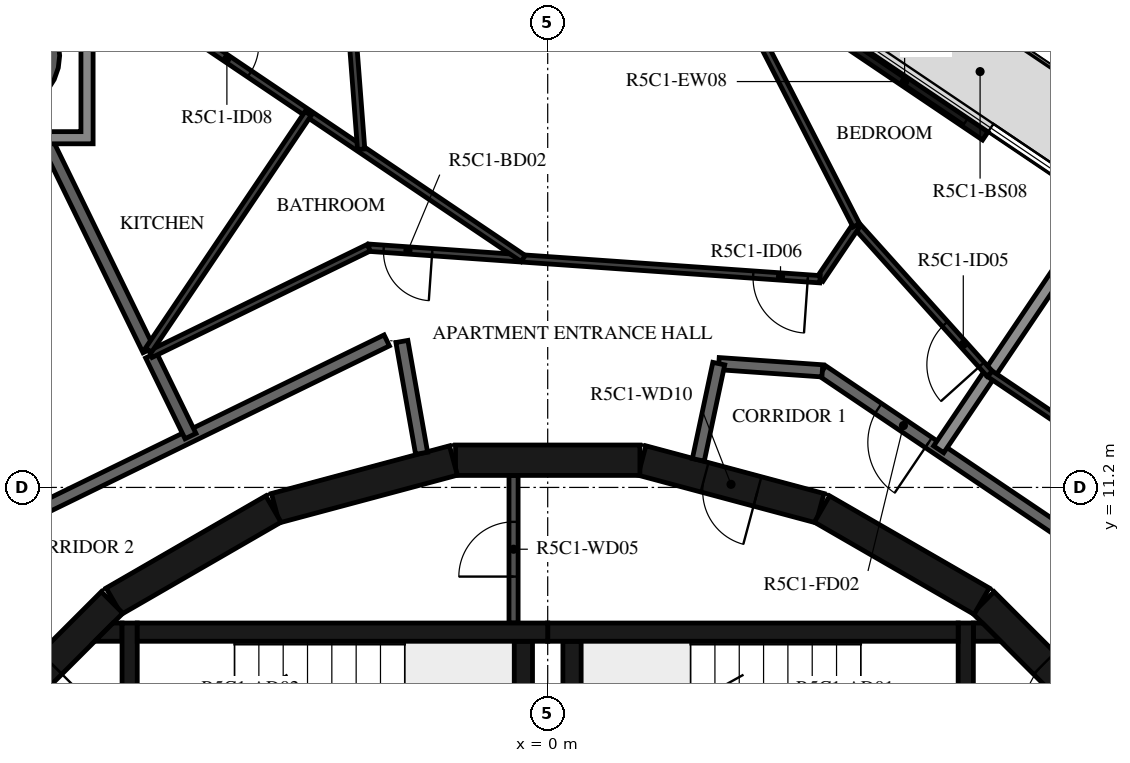
"""IFC4 building model, lengths in metres.
Left out: names, types, materials, properties, quantities, classifications, styles, units other than length and angle.
Written with IfcOpenShell. Run it as: python <this file> out.ifc"""

import sys

from ifc_helpers import new_model, si_unit, direction, frame, frame_2d, origin, origin_2d, place, context, subcontext, project, spatial, polyline, rectangle, hollow_circle, outline, extrude, element, fill, save


model = new_model("IFC4")
c1 = context("Model", 3, precision=1e-05, world=origin(), true_north=direction((0.0, 1.0)))
c2 = subcontext(c1, "Body", "Model", "MODEL_VIEW")
j1 = project(units=[si_unit("LENGTHUNIT", "METRE"), si_unit("PLANEANGLEUNIT", "RADIAN")], contexts=[c1])
p1 = place(None, origin())
s1 = spatial("IfcSite", under=j1, at=p1, CompositionType="ELEMENT")
p2 = place(p1, origin())
s2 = spatial("IfcBuilding", under=s1, at=p2, CompositionType="ELEMENT")
p3 = place(p2, frame((0.0, 0.0, 212.9)))
s3 = spatial("IfcBuildingStorey", under=s2, at=p3, CompositionType="ELEMENT", Elevation=212.9)
p4 = place(p3, frame((-8.926, 18.301, -0.38), z_axis=(0.0, 0.0, 1.0), x_axis=(1.0, 0.0, 0.0)))
e1 = element("IfcColumn", 1, at=p4, inside=s3, PredefinedType="COLUMN", context=c2, shape_type="SweptSolid", body=[
    extrude(hollow_circle(Radius=0.9, WallThickness=0.04, at=origin_2d()), origin(), (0.0, 0.0, 1.0), 3.5),
])
p5 = place(p3, frame((7.196, 16.98, 0.0), z_axis=(0.0, 0.0, 1.0), x_axis=(-0.829044984211, 0.559181915082, 0.0)))
e2 = element("IfcWall", 2, at=p5, inside=s3, PredefinedType="STANDARD", context=c2, shape_type="SweptSolid", body=[
    extrude(rectangle(XDim=3.2, YDim=0.16, at=frame_2d((1.6, 0.0))), origin(), (0.0, 0.0, 1.0), 3.12),
])
p6 = place(p5, frame((0.4, 0.0, 0.0)))
e3 = element("IfcOpeningElement", 3, at=p6, cuts=e2, PredefinedType="OPENING", context=c2, shape_type="SweptSolid", body=[
    extrude(rectangle(XDim=2.4, YDim=2.4, at=frame_2d((1.2, 1.2))), frame((0.0, 0.09, 0.0), z_axis=(0.0, -1.0, 0.0), x_axis=(1.0, 0.0, 0.0)), (0.0, 0.0, 1.0), 0.18),
])
p7 = place(p3, frame((9.308, 7.164, 0.0), z_axis=(0.0, 0.0, 1.0), x_axis=(-0.707106781187, 0.707106781187, 0.0)))
e4 = element("IfcWall", 4, at=p7, inside=s3, PredefinedType="SHEAR", context=c2, shape_type="SweptSolid", body=[
    extrude(rectangle(XDim=3.032, YDim=0.5, at=frame_2d((1.516, 0.0))), origin(), (0.0, 0.0, 1.0), 3.12),
])
p8 = place(p7, frame((0.416, 0.0, 0.0)))
e5 = element("IfcOpeningElement", 5, at=p8, cuts=e4, PredefinedType="OPENING", context=c2, shape_type="SweptSolid", body=[
    extrude(rectangle(XDim=1.2, YDim=2.1, at=frame_2d((0.6, 1.05))), frame((0.0, 0.26, 0.0), z_axis=(0.0, -1.0, 0.0), x_axis=(1.0, 0.0, 0.0)), (0.0, 0.0, 1.0), 0.52),
])
p9 = place(p3, frame((7.137, 9.329, 0.0), z_axis=(0.0, 0.0, 1.0), x_axis=(-0.865975092491, 0.500087131594, 0.0)))
e6 = element("IfcWall", 6, at=p9, inside=s3, PredefinedType="SHEAR", context=c2, shape_type="SweptSolid", body=[
    extrude(rectangle(XDim=3.033, YDim=0.5, at=frame_2d((1.516, 0.0))), origin(), (0.0, 0.0, 1.0), 3.12),
])
p10 = place(p3, frame((4.479, 10.858, 0.0), z_axis=(0.0, 0.0, 1.0), x_axis=(-0.965948410781, 0.258734743916, 0.0)))
e7 = element("IfcWall", 7, at=p10, inside=s3, PredefinedType="SHEAR", context=c2, shape_type="SweptSolid", body=[
    extrude(rectangle(XDim=3.033, YDim=0.5, at=frame_2d((1.516, 0.0))), origin(), (0.0, 0.0, 1.0), 3.12),
])
p11 = place(p10, frame((1.066, 0.0, 0.0)))
e8 = element("IfcOpeningElement", 8, at=p11, cuts=e7, PredefinedType="OPENING", context=c2, shape_type="SweptSolid", body=[
    extrude(rectangle(XDim=0.9, YDim=2.1, at=frame_2d((0.45, 1.05))), frame((0.0, 0.26, 0.0), z_axis=(0.0, -1.0, 0.0), x_axis=(1.0, 0.0, 0.0)), (0.0, 0.0, 1.0), 0.52),
])
for number, where, z_axis, x_axis in (
    (9, (1.516, 11.647, 0.0), (0.0, 0.0, 1.0), (-1.0, 0.0, 0.0)),
    (10, (-1.55, 11.643, 0.0), (0.0, 0.0, 1.0), (-0.966, -0.259, 0.0)),
    (11, (-4.51, 10.845, 0.0), (0.0, 0.0, 1.0), (-0.866, -0.5, 0.0)),
):
    element("IfcWall", number, at=place(p3, frame(where, z_axis=z_axis, x_axis=x_axis)), inside=s3, PredefinedType="SHEAR", context=c2, shape_type="SweptSolid", body=[
        extrude(rectangle(XDim=3.033, YDim=0.5, at=frame_2d((1.516, 0.0))), origin(), (0.0, 0.0, 1.0), 3.12),
    ])
p12 = place(p3, frame((-7.164, 9.308, 0.0), z_axis=(0.0, 0.0, 1.0), x_axis=(-0.707106781187, -0.707106781187, 0.0)))
e12 = element("IfcWall", 12, at=p12, inside=s3, PredefinedType="SHEAR", context=c2, shape_type="SweptSolid", body=[
    extrude(rectangle(XDim=3.032, YDim=0.5, at=frame_2d((1.516, 0.0))), origin(), (0.0, 0.0, 1.0), 3.12),
])
p13 = place(p12, frame((1.416, 0.0, 0.0)))
e13 = element("IfcOpeningElement", 13, at=p13, cuts=e12, PredefinedType="OPENING", context=c2, shape_type="SweptSolid", body=[
    extrude(rectangle(XDim=1.2, YDim=2.1, at=frame_2d((0.6, 1.05))), frame((0.0, 0.26, 0.0), z_axis=(0.0, -1.0, 0.0), x_axis=(1.0, 0.0, 0.0)), (0.0, 0.0, 1.0), 0.52),
])
p14 = place(p3, frame((0.0, 8.82, 0.0), z_axis=(0.0, 0.0, 1.0), x_axis=(1.0, 0.0, 0.0)))
e14 = element("IfcWall", 14, at=p14, inside=s3, PredefinedType="SHEAR", context=c2, shape_type="SweptSolid", body=[
    extrude(rectangle(XDim=6.75, YDim=0.3, at=frame_2d((3.375, 0.0))), origin(), (0.0, 0.0, 1.0), 3.12),
])
p15 = place(p3, frame((0.4, 5.35, 0.0), z_axis=(0.0, 0.0, 1.0), x_axis=(0.0, 1.0, 0.0)))
e15 = element("IfcWall", 15, at=p15, inside=s3, PredefinedType="SHEAR", context=c2, shape_type="SweptSolid", body=[
    extrude(rectangle(XDim=3.32, YDim=0.3, at=frame_2d((1.66, 0.0))), origin(), (0.0, 0.0, 1.0), 3.12),
])
p16 = place(p3, frame((6.875, 5.05, 0.0), z_axis=(0.0, 0.0, 1.0), x_axis=(0.0, 1.0, 0.0)))
e16 = element("IfcWall", 16, at=p16, inside=s3, PredefinedType="SHEAR", context=c2, shape_type="SweptSolid", body=[
    extrude(rectangle(XDim=3.92, YDim=0.25, at=frame_2d((1.96, 0.0))), origin(), (0.0, 0.0, 1.0), 3.12),
])
p17 = place(p16, frame((1.11, 0.0, 0.0)))
e17 = element("IfcOpeningElement", 17, at=p17, cuts=e16, PredefinedType="OPENING", context=c2, shape_type="SweptSolid", body=[
    extrude(rectangle(XDim=1.2, YDim=2.1, at=frame_2d((0.6, 1.05))), frame((0.0, 0.135, 0.0), z_axis=(0.0, -1.0, 0.0), x_axis=(1.0, 0.0, 0.0)), (0.0, 0.0, 1.0), 0.27),
])
p18 = place(p3, origin())
e18 = element("IfcWall", 18, at=p18, inside=s3, PredefinedType="SHEAR", context=c2, shape_type="SweptSolid", body=[
    extrude(outline(polyline([(7.448, 8.67), (7.0, 8.67), (7.0, 8.97), (7.148, 8.97), (7.448, 8.67)])), origin(), (0.0, 0.0, 1.0), 3.12),
])
p19 = place(p3, frame((-6.75, 8.82, 0.0), z_axis=(0.0, 0.0, 1.0), x_axis=(1.0, 0.0, 0.0)))
e19 = element("IfcWall", 19, at=p19, inside=s3, PredefinedType="SHEAR", context=c2, shape_type="SweptSolid", body=[
    extrude(rectangle(XDim=6.75, YDim=0.3, at=frame_2d((3.375, 0.0))), origin(), (0.0, 0.0, 1.0), 3.12),
])
p20 = place(p3, frame((-0.4, 5.35, 0.0), z_axis=(0.0, 0.0, 1.0), x_axis=(0.0, 1.0, 0.0)))
e20 = element("IfcWall", 20, at=p20, inside=s3, PredefinedType="SHEAR", context=c2, shape_type="SweptSolid", body=[
    extrude(rectangle(XDim=3.32, YDim=0.3, at=frame_2d((1.66, 0.0))), origin(), (0.0, 0.0, 1.0), 3.12),
])
p21 = place(p3, frame((-6.875, 8.97, 0.0), z_axis=(0.0, 0.0, 1.0), x_axis=(0.0, -1.0, 0.0)))
e21 = element("IfcWall", 21, at=p21, inside=s3, PredefinedType="SHEAR", context=c2, shape_type="SweptSolid", body=[
    extrude(rectangle(XDim=3.92, YDim=0.25, at=frame_2d((1.96, 0.0))), origin(), (0.0, 0.0, 1.0), 3.12),
])
p22 = place(p21, frame((1.61, 0.0, 0.0)))
e22 = element("IfcOpeningElement", 22, at=p22, cuts=e21, PredefinedType="OPENING", context=c2, shape_type="SweptSolid", body=[
    extrude(rectangle(XDim=1.2, YDim=2.1, at=frame_2d((0.6, 1.05))), frame((0.0, 0.135, 0.0), z_axis=(0.0, -1.0, 0.0), x_axis=(1.0, 0.0, 0.0)), (0.0, 0.0, 1.0), 0.27),
])
p23 = place(p3, origin())
e23 = element("IfcWall", 23, at=p23, inside=s3, PredefinedType="SHEAR", context=c2, shape_type="SweptSolid", body=[
    extrude(outline(polyline([(-7.148, 8.97), (-7.0, 8.97), (-7.0, 8.67), (-7.448, 8.67), (-7.148, 8.97)])), origin(), (0.0, 0.0, 1.0), 3.12),
])
p24 = place(p3, frame((-0.562, 8.97, 0.0), z_axis=(0.0, 0.0, 1.0), x_axis=(0.0, 1.0, 0.0)))
e24 = element("IfcWall", 24, at=p24, inside=s3, PredefinedType="PARTITIONING", context=c2, shape_type="SweptSolid", body=[
    extrude(rectangle(XDim=2.427, YDim=0.15, at=frame_2d((1.214, 0.0))), origin(), (0.0, 0.0, 1.0), 3.12),
])
p25 = place(p24, frame((0.764, 0.0, 0.0)))
e25 = element("IfcOpeningElement", 25, at=p25, cuts=e24, PredefinedType="OPENING", context=c2, shape_type="SweptSolid", body=[
    extrude(rectangle(XDim=0.9, YDim=2.1, at=frame_2d((0.45, 1.05))), frame((0.0, 0.085, 0.0), z_axis=(0.0, -1.0, 0.0), x_axis=(1.0, 0.0, 0.0)), (0.0, 0.0, 1.0), 0.17),
])
p26 = place(p3, frame((10.47, 9.101, 0.0), z_axis=(0.0, 0.0, 1.0), x_axis=(-0.829035841718, 0.559195469534, 0.0)))
e26 = element("IfcWall", 26, at=p26, inside=s3, PredefinedType="STANDARD", context=c2, shape_type="SweptSolid", body=[
    extrude(rectangle(XDim=7.181, YDim=0.2, at=frame_2d((3.591, 0.0))), origin(), (0.0, 0.0, 1.0), 3.12),
])
p27 = place(p26, frame((0.2, 0.0, 0.0)))
e27 = element("IfcOpeningElement", 27, at=p27, cuts=e26, PredefinedType="OPENING", context=c2, shape_type="SweptSolid", body=[
    extrude(rectangle(XDim=1.0, YDim=2.1, at=frame_2d((0.5, 1.05))), frame((0.0, 0.11, 0.0), z_axis=(0.0, -1.0, 0.0), x_axis=(1.0, 0.0, 0.0)), (0.0, 0.0, 1.0), 0.22),
])
p28 = place(p26, frame((5.073, 0.0, 0.0)))
e28 = element("IfcOpeningElement", 28, at=p28, cuts=e26, PredefinedType="OPENING", context=c2, shape_type="SweptSolid", body=[
    extrude(rectangle(XDim=1.0, YDim=2.1, at=frame_2d((0.5, 1.05))), frame((0.0, 0.11, 0.0), z_axis=(0.0, -1.0, 0.0), x_axis=(1.0, 0.0, 0.0)), (0.0, 0.0, 1.0), 0.22),
])
p29 = place(p3, frame((4.517, 13.117, 0.0), z_axis=(0.0, 0.0, 1.0), x_axis=(-0.997562153664, 0.069783591025, 0.0)))
e29 = element("IfcWall", 29, at=p29, inside=s3, PredefinedType="STANDARD", context=c2, shape_type="SweptSolid", body=[
    extrude(rectangle(XDim=1.707, YDim=0.2, at=frame_2d((0.854, 0.0))), origin(), (0.0, 0.0, 1.0), 3.12),
])
p30 = place(p3, frame((2.813, 13.236, 0.0), z_axis=(0.0, 0.0, 1.0), x_axis=(-0.207911086063, -0.978147729278, 0.0)))
e30 = element("IfcWall", 30, at=p30, inside=s3, PredefinedType="STANDARD", context=c2, shape_type="SweptSolid", body=[
    extrude(rectangle(XDim=1.618, YDim=0.2, at=frame_2d((0.809, 0.0))), origin(), (0.0, 0.0, 1.0), 3.12),
])
p31 = place(p3, frame((-2.074, 11.761, 0.0), z_axis=(0.0, 0.0, 1.0), x_axis=(-0.173740587112, 0.984791454263, 0.0)))
e31 = element("IfcWall", 31, at=p31, inside=s3, PredefinedType="STANDARD", context=c2, shape_type="SweptSolid", body=[
    extrude(rectangle(XDim=1.867, YDim=0.2, at=frame_2d((0.934, 0.0))), origin(), (0.0, 0.0, 1.0), 3.12),
])
p32 = place(p3, frame((-2.647, 13.618, 0.0), z_axis=(0.0, 0.0, 1.0), x_axis=(-0.898796543751, -0.438366026218, 0.0)))
e32 = element("IfcWall", 32, at=p32, inside=s3, PredefinedType="STANDARD", context=c2, shape_type="SweptSolid", body=[
    extrude(rectangle(XDim=7.181, YDim=0.2, at=frame_2d((3.591, 0.0))), origin(), (0.0, 0.0, 1.0), 3.12),
])
p33 = place(p3, frame((9.104, 15.79, 0.0), z_axis=(0.0, 0.0, 1.0), x_axis=(-0.559193912135, -0.829036892201, 0.0)))
e33 = element("IfcWall", 33, at=p33, inside=s3, PredefinedType="STANDARD", context=c2, shape_type="SweptSolid", body=[
    extrude(rectangle(XDim=4.781, YDim=0.2, at=frame_2d((2.39, 0.0))), origin(), (0.0, 0.0, 1.0), 2.73),
])
p34 = place(p3, frame((-6.522, 13.373, 0.0), z_axis=(0.0, 0.0, 1.0), x_axis=(0.438277270821, -0.8988398266, 0.0)))
e34 = element("IfcWall", 34, at=p34, inside=s3, PredefinedType="STANDARD", context=c2, shape_type="SweptSolid", body=[
    extrude(rectangle(XDim=1.479, YDim=0.2, at=frame_2d((0.74, 0.0))), origin(), (0.0, 0.0, 1.0), 3.12),
])
p35 = place(p3, frame((-8.219, 16.851, 0.0), z_axis=(0.0, 0.0, 1.0), x_axis=(0.438291091101, -0.898833087654, 0.0)))
e35 = element("IfcWall", 35, at=p35, inside=s3, PredefinedType="STANDARD", context=c2, shape_type="SweptSolid", body=[
    extrude(rectangle(XDim=3.774, YDim=0.2, at=frame_2d((1.887, 0.0))), origin(), (0.0, 0.0, 1.0), 3.12),
])
p36 = place(p3, frame((11.642, 10.12, 0.0), z_axis=(0.0, 0.0, 1.0), x_axis=(-0.829054664054, 0.559167563446, 0.0)))
e36 = element("IfcWall", 36, at=p36, inside=s3, PredefinedType="PARTITIONING", context=c2, shape_type="SweptSolid", body=[
    extrude(rectangle(XDim=5.275, YDim=0.12, at=frame_2d((2.637, 0.0))), origin(), (0.0, 0.0, 1.0), 3.12),
])
p37 = place(p36, frame((0.2, 0.0, 0.0)))
e37 = element("IfcOpeningElement", 37, at=p37, cuts=e36, PredefinedType="OPENING", context=c2, shape_type="SweptSolid", body=[
    extrude(rectangle(XDim=0.9, YDim=2.1, at=frame_2d((0.45, 1.05))), frame((0.0, 0.07, 0.0), z_axis=(0.0, -1.0, 0.0), x_axis=(1.0, 0.0, 0.0)), (0.0, 0.0, 1.0), 0.14),
])
p38 = place(p3, frame((7.269, 13.07, 0.0), z_axis=(0.0, 0.0, 1.0), x_axis=(-0.668495993587, 0.743715743116, 0.0)))
e38 = element("IfcWall", 38, at=p38, inside=s3, PredefinedType="PARTITIONING", context=c2, shape_type="SweptSolid", body=[
    extrude(rectangle(XDim=3.281, YDim=0.12, at=frame_2d((1.641, 0.0))), origin(), (0.0, 0.0, 1.0), 3.12),
])
p39 = place(p38, frame((0.2, 0.0, 0.0)))
e39 = element("IfcOpeningElement", 39, at=p39, cuts=e38, PredefinedType="OPENING", context=c2, shape_type="SweptSolid", body=[
    extrude(rectangle(XDim=0.9, YDim=2.1, at=frame_2d((0.45, 1.05))), frame((0.0, 0.07, 0.0), z_axis=(0.0, -1.0, 0.0), x_axis=(1.0, 0.0, 0.0)), (0.0, 0.0, 1.0), 0.14),
])
p40 = place(p3, frame((5.075, 15.51, 0.0), z_axis=(0.0, 0.0, 1.0), x_axis=(-0.559221936342, -0.829017988896, 0.0)))
e40 = element("IfcWall", 40, at=p40, inside=s3, PredefinedType="PARTITIONING", context=c2, shape_type="SweptSolid", body=[
    extrude(rectangle(XDim=1.07, YDim=0.12, at=frame_2d((0.535, 0.0))), origin(), (0.0, 0.0, 1.0), 3.12),
])
p41 = place(p3, frame((4.477, 14.623, 0.0), z_axis=(0.0, 0.0, 1.0), x_axis=(-0.997564862172, 0.069744861884, 0.0)))
e41 = element("IfcWall", 41, at=p41, inside=s3, PredefinedType="PARTITIONING", context=c2, shape_type="SweptSolid", body=[
    extrude(rectangle(XDim=7.438, YDim=0.12, at=frame_2d((3.719, 0.0))), origin(), (0.0, 0.0, 1.0), 3.12),
])
p42 = place(p41, frame((0.2, 0.0, 0.0)))
e42 = element("IfcOpeningElement", 42, at=p42, cuts=e41, PredefinedType="OPENING", context=c2, shape_type="SweptSolid", body=[
    extrude(rectangle(XDim=0.9, YDim=2.1, at=frame_2d((0.45, 1.05))), frame((0.0, 0.07, 0.0), z_axis=(0.0, -1.0, 0.0), x_axis=(1.0, 0.0, 0.0)), (0.0, 0.0, 1.0), 0.14),
])
p43 = place(p41, frame((6.392, 0.0, 0.0)))
e43 = element("IfcOpeningElement", 43, at=p43, cuts=e41, PredefinedType="OPENING", context=c2, shape_type="SweptSolid", body=[
    extrude(rectangle(XDim=0.8, YDim=2.1, at=frame_2d((0.4, 1.05))), frame((0.0, 0.07, 0.0), z_axis=(0.0, -1.0, 0.0), x_axis=(1.0, 0.0, 0.0)), (0.0, 0.0, 1.0), 0.14),
])
p44 = place(p3, frame((-2.943, 15.142, 0.0), z_axis=(0.0, 0.0, 1.0), x_axis=(-0.89881075705, -0.438336883014, 0.0)))
e44 = element("IfcWall", 44, at=p44, inside=s3, PredefinedType="PARTITIONING", context=c2, shape_type="SweptSolid", body=[
    extrude(rectangle(XDim=3.992, YDim=0.12, at=frame_2d((1.996, 0.0))), origin(), (0.0, 0.0, 1.0), 3.12),
])
p45 = place(p3, frame((2.696, 20.148, 0.0), z_axis=(0.0, 0.0, 1.0), x_axis=(0.456387956197, -0.889780890691, 0.0)))
e45 = element("IfcWall", 45, at=p45, inside=s3, PredefinedType="PARTITIONING", context=c2, shape_type="SweptSolid", body=[
    extrude(rectangle(XDim=5.213, YDim=0.12, at=frame_2d((2.606, 0.0))), origin(), (0.0, 0.0, 1.0), 3.12),
])
p46 = place(p3, frame((-7.476, 19.735, 0.0), z_axis=(0.0, 0.0, 1.0), x_axis=(0.829035412992, -0.559196105142, 0.0)))
e46 = element("IfcWall", 46, at=p46, inside=s3, PredefinedType="PARTITIONING", context=c2, shape_type="SweptSolid", body=[
    extrude(rectangle(XDim=8.531, YDim=0.12, at=frame_2d((4.266, 0.0))), origin(), (0.0, 0.0, 1.0), 3.12),
])
p47 = place(p46, frame((2.204, 0.0, 0.0)))
e47 = element("IfcOpeningElement", 47, at=p47, cuts=e46, PredefinedType="OPENING", context=c2, shape_type="SweptSolid", body=[
    extrude(rectangle(XDim=0.9, YDim=2.1, at=frame_2d((0.45, 1.05))), frame((0.0, 0.07, 0.0), z_axis=(0.0, -1.0, 0.0), x_axis=(1.0, 0.0, 0.0)), (0.0, 0.0, 1.0), 0.14),
])
p48 = place(p3, frame((-3.653, 24.394, 0.0), z_axis=(0.0, 0.0, 1.0), x_axis=(0.076513576433, -0.997068539581, 0.0)))
e48 = element("IfcWall", 48, at=p48, inside=s3, PredefinedType="PARTITIONING", context=c2, shape_type="SweptSolid", body=[
    extrude(rectangle(XDim=7.655, YDim=0.12, at=frame_2d((3.827, 0.0))), origin(), (0.0, 0.0, 1.0), 3.12),
])
p49 = place(p48, frame((0.6, 0.0, 0.0)))
e49 = element("IfcOpeningElement", 49, at=p49, cuts=e48, PredefinedType="OPENING", context=c2, shape_type="SweptSolid", body=[
    extrude(rectangle(XDim=0.9, YDim=2.1, at=frame_2d((0.45, 1.05))), frame((0.0, 0.07, 0.0), z_axis=(0.0, -1.0, 0.0), x_axis=(1.0, 0.0, 0.0)), (0.0, 0.0, 1.0), 0.14),
])
p50 = place(p3, frame((-3.939, 17.35, 0.0), z_axis=(0.0, 0.0, 1.0), x_axis=(-0.559193216274, -0.829037361566, 0.0)))
e50 = element("IfcWall", 50, at=p50, inside=s3, PredefinedType="PARTITIONING", context=c2, shape_type="SweptSolid", body=[
    extrude(rectangle(XDim=4.694, YDim=0.12, at=frame_2d((2.347, 0.0))), origin(), (0.0, 0.0, 1.0), 3.12),
])
p51 = place(p3, origin())
e51 = element("IfcWall", 51, at=p51, inside=s3, PredefinedType="STANDARD", context=c2, shape_type="SweptSolid", body=[
    extrude(outline(polyline([(-7.476, 19.751), (-7.476, 16.851), (-10.376, 16.851), (-10.376, 19.751), (-7.476, 19.751)]), holes=[polyline([(-10.176, 17.051), (-7.676, 17.051), (-7.676, 19.551), (-10.176, 19.551), (-10.176, 17.051)])]), origin(), (0.0, 0.0, 1.0), 3.12),
])
p52 = place(p6, origin())
e52 = element("IfcDoor", 52, at=p52, inside=s3, OperationType="DOUBLE_DOOR_SLIDING", PredefinedType="DOOR", context=c2, shape_type="SweptSolid", body=[
    extrude(rectangle(XDim=2.4, YDim=2.4, at=frame_2d((1.2, 1.2))), frame((0.0, 0.025, 0.0), z_axis=(0.0, -1.0, 0.0), x_axis=(1.0, 0.0, 0.0)), (0.0, 0.0, 1.0), 0.05),
])
fill(e3, e52)
p53 = place(p8, origin())
e53 = element("IfcDoor", 53, at=p53, inside=s3, OperationType="SINGLE_SWING_RIGHT", PredefinedType="DOOR", context=c2, shape_type="SweptSolid", body=[
    extrude(rectangle(XDim=1.2, YDim=2.1, at=frame_2d((0.6, 1.05))), frame((0.0, 0.025, 0.0), z_axis=(0.0, -1.0, 0.0), x_axis=(1.0, 0.0, 0.0)), (0.0, 0.0, 1.0), 0.05),
])
fill(e5, e53)
p54 = place(p13, origin())
e54 = element("IfcDoor", 54, at=p54, inside=s3, OperationType="SINGLE_SWING_RIGHT", PredefinedType="DOOR", context=c2, shape_type="SweptSolid", body=[
    extrude(rectangle(XDim=1.2, YDim=2.1, at=frame_2d((0.6, 1.05))), frame((0.0, 0.025, 0.0), z_axis=(0.0, -1.0, 0.0), x_axis=(1.0, 0.0, 0.0)), (0.0, 0.0, 1.0), 0.05),
])
fill(e13, e54)
p55 = place(p25, origin())
e55 = element("IfcDoor", 55, at=p55, inside=s3, OperationType="SINGLE_SWING_LEFT", PredefinedType="DOOR", context=c2, shape_type="SweptSolid", body=[
    extrude(rectangle(XDim=0.9, YDim=2.1, at=frame_2d((0.45, 1.05))), frame((0.0, 0.025, 0.0), z_axis=(0.0, -1.0, 0.0), x_axis=(1.0, 0.0, 0.0)), (0.0, 0.0, 1.0), 0.05),
])
fill(e25, e55)
p56 = place(p11, origin())
e56 = element("IfcDoor", 56, at=p56, inside=s3, OperationType="SINGLE_SWING_RIGHT", PredefinedType="DOOR", context=c2, shape_type="SweptSolid", body=[
    extrude(rectangle(XDim=0.9, YDim=2.1, at=frame_2d((0.45, 1.05))), frame((0.0, 0.025, 0.0), z_axis=(0.0, -1.0, 0.0), x_axis=(1.0, 0.0, 0.0)), (0.0, 0.0, 1.0), 0.05),
])
fill(e8, e56)
p57 = place(p28, origin())
e57 = element("IfcDoor", 57, at=p57, inside=s3, OperationType="SINGLE_SWING_RIGHT", PredefinedType="DOOR", context=c2, shape_type="SweptSolid", body=[
    extrude(rectangle(XDim=1.0, YDim=2.1, at=frame_2d((0.5, 1.05))), frame((0.0, 0.025, 0.0), z_axis=(0.0, -1.0, 0.0), x_axis=(1.0, 0.0, 0.0)), (0.0, 0.0, 1.0), 0.05),
])
fill(e28, e57)
p58 = place(p39, origin())
e58 = element("IfcDoor", 58, at=p58, inside=s3, OperationType="SINGLE_SWING_RIGHT", PredefinedType="DOOR", context=c2, shape_type="SweptSolid", body=[
    extrude(rectangle(XDim=0.9, YDim=2.1, at=frame_2d((0.45, 1.05))), frame((0.0, 0.025, 0.0), z_axis=(0.0, -1.0, 0.0), x_axis=(1.0, 0.0, 0.0)), (0.0, 0.0, 1.0), 0.05),
])
fill(e39, e58)
p59 = place(p42, origin())
e59 = element("IfcDoor", 59, at=p59, inside=s3, OperationType="SINGLE_SWING_RIGHT", PredefinedType="DOOR", context=c2, shape_type="SweptSolid", body=[
    extrude(rectangle(XDim=0.9, YDim=2.1, at=frame_2d((0.45, 1.05))), frame((0.0, 0.025, 0.0), z_axis=(0.0, -1.0, 0.0), x_axis=(1.0, 0.0, 0.0)), (0.0, 0.0, 1.0), 0.05),
])
fill(e42, e59)
p60 = place(p43, origin())
e60 = element("IfcDoor", 60, at=p60, inside=s3, OperationType="SINGLE_SWING_RIGHT", PredefinedType="DOOR", context=c2, shape_type="SweptSolid", body=[
    extrude(rectangle(XDim=0.8, YDim=2.1, at=frame_2d((0.4, 1.05))), frame((0.0, 0.025, 0.0), z_axis=(0.0, -1.0, 0.0), x_axis=(1.0, 0.0, 0.0)), (0.0, 0.0, 1.0), 0.05),
])
fill(e43, e60)
p61 = place(p47, origin())
e61 = element("IfcDoor", 61, at=p61, inside=s3, OperationType="SINGLE_SWING_LEFT", PredefinedType="DOOR", context=c2, shape_type="SweptSolid", body=[
    extrude(rectangle(XDim=0.9, YDim=2.1, at=frame_2d((0.45, 1.05))), frame((0.0, 0.025, 0.0), z_axis=(0.0, -1.0, 0.0), x_axis=(1.0, 0.0, 0.0)), (0.0, 0.0, 1.0), 0.05),
])
fill(e47, e61)
save(model, sys.argv[1])
